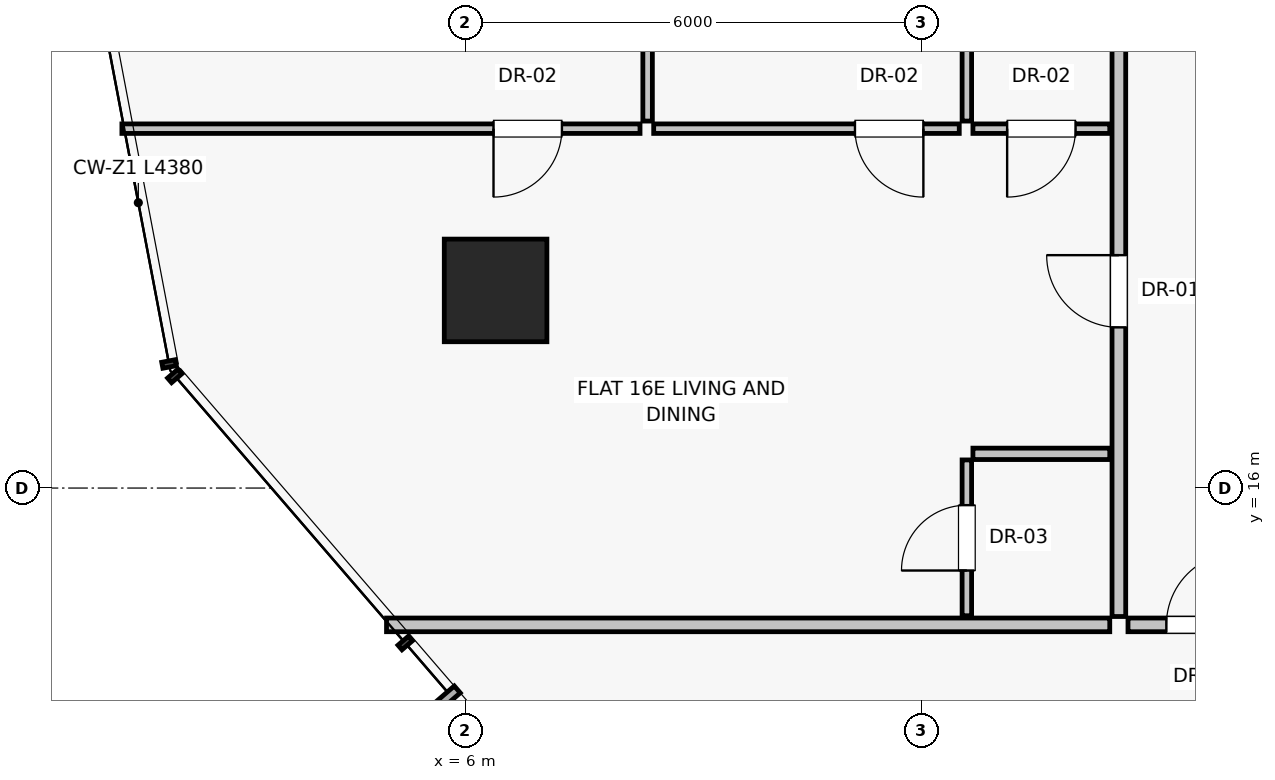
"""IFC4 building model, lengths in metres.
Left out: names, types, materials, properties, quantities, classifications, styles, units other than length and angle.
Written with IfcOpenShell. Run it as: python <this file> out.ifc"""

import sys

from ifc_helpers import new_model, si_unit, direction, frame, frame_2d, origin, origin_2d, place, context, subcontext, project, spatial, rectangle, extrude, source, transform, mapped, element, fill, save


model = new_model("IFC4")
c1 = context("Model", 3, precision=1e-05, world=origin(), true_north=direction((0.0, 1.0)))
c2 = subcontext(c1, "Body", "Model", "MODEL_VIEW")
j1 = project(units=[si_unit("LENGTHUNIT", "METRE"), si_unit("PLANEANGLEUNIT", "RADIAN")], contexts=[c1])
p1 = place(None, origin())
s1 = spatial("IfcSite", under=j1, at=p1, CompositionType="ELEMENT")
p2 = place(p1, origin())
s2 = spatial("IfcBuilding", under=s1, at=p2, CompositionType="ELEMENT")
p3 = place(p2, frame((0.0, 0.0, 60.85)))
s3 = spatial("IfcBuildingStorey", under=s2, at=p3, CompositionType="ELEMENT", Elevation=60.85)
p4 = place(p3, frame((6.4, 18.6, 0.0), z_axis=(0.0, 0.0, 1.0), x_axis=(1.0, 0.0, 0.0)))
e1 = element("IfcColumn", 1, at=p4, inside=s3, PredefinedType="COLUMN", context=c2, shape_type="SweptSolid", body=[
    extrude(rectangle(XDim=1.35, YDim=1.35, at=origin_2d()), origin(), (0.0, 0.0, 1.0), 3.25),
])
p5 = place(p3, frame((14.48, 14.2, 0.0), z_axis=(0.0, 0.0, 1.0), x_axis=(-1.0, 0.0, 0.0)))
e2 = element("IfcWall", 2, at=p5, inside=s3, PredefinedType="PARTITIONING", context=c2, shape_type="SweptSolid", body=[
    extrude(rectangle(XDim=9.515, YDim=0.18, at=frame_2d((4.757, 0.0))), origin(), (0.0, 0.0, 1.0), 3.0),
])
p6 = place(p3, frame((14.6, 14.31, 0.0), z_axis=(0.0, 0.0, 1.0), x_axis=(0.0, 1.0, 0.0)))
e3 = element("IfcWall", 3, at=p6, inside=s3, PredefinedType="PARTITIONING", context=c2, shape_type="SweptSolid", body=[
    extrude(rectangle(XDim=11.438, YDim=0.18, at=frame_2d((5.719, 0.0))), origin(), (0.0, 0.0, 1.0), 3.0),
])
p7 = place(p6, frame((3.804, 0.0, 0.0)))
e4 = element("IfcOpeningElement", 4, at=p7, cuts=e3, PredefinedType="OPENING", context=c2, shape_type="SweptSolid", body=[
    extrude(rectangle(XDim=0.95, YDim=2.02, at=frame_2d((0.475, 1.01))), frame((0.0, 0.1, 0.0), z_axis=(0.0, -1.0, 0.0), x_axis=(1.0, 0.0, 0.0)), (0.0, 0.0, 1.0), 0.2),
])
p8 = place(p3, frame((14.48, 16.45, 0.0), z_axis=(0.0, 0.0, 1.0), x_axis=(-1.0, 0.0, 0.0)))
e5 = element("IfcWall", 5, at=p8, inside=s3, PredefinedType="PARTITIONING", context=c2, shape_type="SweptSolid", body=[
    extrude(rectangle(XDim=1.8, YDim=0.15, at=frame_2d((0.9, 0.0))), origin(), (0.0, 0.0, 1.0), 3.0),
])
p9 = place(p3, frame((12.6, 14.32, 0.0), z_axis=(0.0, 0.0, 1.0), x_axis=(0.0, 1.0, 0.0)))
e6 = element("IfcWall", 6, at=p9, inside=s3, PredefinedType="PARTITIONING", context=c2, shape_type="SweptSolid", body=[
    extrude(rectangle(XDim=2.05, YDim=0.125, at=frame_2d((1.025, 0.0))), origin(), (0.0, 0.0, 1.0), 3.0),
])
p10 = place(p9, frame((0.595, 0.0, 0.0)))
e7 = element("IfcOpeningElement", 7, at=p10, cuts=e6, PredefinedType="OPENING", context=c2, shape_type="SweptSolid", body=[
    extrude(rectangle(XDim=0.86, YDim=2.01, at=frame_2d((0.43, 1.005))), frame((0.0, 0.073, 0.0), z_axis=(0.0, -1.0, 0.0), x_axis=(1.0, 0.0, 0.0)), (0.0, 0.0, 1.0), 0.145),
])
p11 = place(p3, frame((14.48, 20.728, 0.0), z_axis=(0.0, 0.0, 1.0), x_axis=(-1.0, 0.0, 0.0)))
e8 = element("IfcWall", 8, at=p11, inside=s3, PredefinedType="PARTITIONING", context=c2, shape_type="SweptSolid", body=[
    extrude(rectangle(XDim=1.8, YDim=0.125, at=frame_2d((0.9, 0.0))), origin(), (0.0, 0.0, 1.0), 3.0),
])
p12 = place(p11, frame((0.45, 0.0, 0.0)))
e9 = element("IfcOpeningElement", 9, at=p12, cuts=e8, PredefinedType="OPENING", context=c2, shape_type="SweptSolid", body=[
    extrude(rectangle(XDim=0.9, YDim=2.01, at=frame_2d((0.45, 1.005))), frame((0.0, 0.073, 0.0), z_axis=(0.0, -1.0, 0.0), x_axis=(1.0, 0.0, 0.0)), (0.0, 0.0, 1.0), 0.145),
])
for number, where, z_axis, x_axis in (
    (10, (12.6, 20.828, 0.0), (0.0, 0.0, 1.0), (0.0, 1.0, 0.0)),
    (11, (8.4, 20.828, 0.0), (0.0, 0.0, 1.0), (0.0, 1.0, 0.0)),
):
    element("IfcWall", number, at=place(p3, frame(where, z_axis=z_axis, x_axis=x_axis)), inside=s3, PredefinedType="PARTITIONING", context=c2, shape_type="SweptSolid", body=[
        extrude(rectangle(XDim=4.91, YDim=0.125, at=frame_2d((2.455, 0.0))), origin(), (0.0, 0.0, 1.0), 3.0),
    ])
p13 = place(p3, frame((12.5, 20.728, 0.0), z_axis=(0.0, 0.0, 1.0), x_axis=(-1.0, 0.0, 0.0)))
e12 = element("IfcWall", 12, at=p13, inside=s3, PredefinedType="PARTITIONING", context=c2, shape_type="SweptSolid", body=[
    extrude(rectangle(XDim=4.02, YDim=0.125, at=frame_2d((2.01, 0.0))), origin(), (0.0, 0.0, 1.0), 3.0),
])
p14 = place(p13, frame((0.472, 0.0, 0.0)))
e13 = element("IfcOpeningElement", 13, at=p14, cuts=e12, PredefinedType="OPENING", context=c2, shape_type="SweptSolid", body=[
    extrude(rectangle(XDim=0.9, YDim=2.01, at=frame_2d((0.45, 1.005))), frame((0.0, 0.073, 0.0), z_axis=(0.0, -1.0, 0.0), x_axis=(1.0, 0.0, 0.0)), (0.0, 0.0, 1.0), 0.145),
])
p15 = place(p3, frame((8.3, 20.728, 0.0), z_axis=(0.0, 0.0, 1.0), x_axis=(-1.0, 0.0, 0.0)))
e14 = element("IfcWall", 14, at=p15, inside=s3, PredefinedType="PARTITIONING", context=c2, shape_type="SweptSolid", body=[
    extrude(rectangle(XDim=6.816, YDim=0.125, at=frame_2d((3.408, 0.0))), origin(), (0.0, 0.0, 1.0), 3.0),
])
p16 = place(p15, frame((1.027, 0.0, 0.0)))
e15 = element("IfcOpeningElement", 15, at=p16, cuts=e14, PredefinedType="OPENING", context=c2, shape_type="SweptSolid", body=[
    extrude(rectangle(XDim=0.9, YDim=2.01, at=frame_2d((0.45, 1.005))), frame((0.0, 0.073, 0.0), z_axis=(0.0, -1.0, 0.0), x_axis=(1.0, 0.0, 0.0)), (0.0, 0.0, 1.0), 0.145),
])
p17 = place(p3, frame((14.72, 14.2, 0.0), z_axis=(0.0, 0.0, 1.0), x_axis=(1.0, 0.0, 0.0)))
e16 = element("IfcWall", 16, at=p17, inside=s3, PredefinedType="PARTITIONING", context=c2, shape_type="SweptSolid", body=[
    extrude(rectangle(XDim=1.96, YDim=0.18, at=frame_2d((0.98, 0.0))), origin(), (0.0, 0.0, 1.0), 3.0),
])
p18 = place(p17, frame((0.505, 0.0, 0.0)))
e17 = element("IfcOpeningElement", 17, at=p18, cuts=e16, PredefinedType="OPENING", context=c2, shape_type="SweptSolid", body=[
    extrude(rectangle(XDim=0.95, YDim=2.02, at=frame_2d((0.475, 1.01))), frame((0.0, 0.1, 0.0), z_axis=(0.0, -1.0, 0.0), x_axis=(1.0, 0.0, 0.0)), (0.0, 0.0, 1.0), 0.2),
])
m1 = source(origin(), c2, "Body", "SweptSolid", [
    extrude(rectangle(XDim=0.95, YDim=2.02, at=frame_2d((0.475, 1.01))), frame((0.0, 0.025, 0.0), z_axis=(0.0, -1.0, 0.0), x_axis=(1.0, 0.0, 0.0)), (0.0, 0.0, 1.0), 0.05),
])
p19 = place(p7, origin())
e18 = element("IfcDoor", 18, at=p19, inside=s3, OperationType="SINGLE_SWING_RIGHT", PredefinedType="DOOR", context=c2, shape_type="MappedRepresentation", body=[
    mapped(m1, transform((0.0, 0.0, 0.0), scale=1.0)),
])
fill(e4, e18)
m2 = source(origin(), c2, "Body", "SweptSolid", [
    extrude(rectangle(XDim=0.86, YDim=2.01, at=frame_2d((0.43, 1.005))), frame((0.0, 0.025, 0.0), z_axis=(0.0, -1.0, 0.0), x_axis=(1.0, 0.0, 0.0)), (0.0, 0.0, 1.0), 0.05),
])
p20 = place(p10, origin())
e19 = element("IfcDoor", 19, at=p20, inside=s3, OperationType="SINGLE_SWING_LEFT", PredefinedType="DOOR", context=c2, shape_type="MappedRepresentation", body=[
    mapped(m2, transform((0.0, 0.0, 0.0), scale=1.0)),
])
fill(e7, e19)
m3 = source(origin(), c2, "Body", "SweptSolid", [
    extrude(rectangle(XDim=0.9, YDim=2.01, at=frame_2d((0.45, 1.005))), frame((0.0, 0.025, 0.0), z_axis=(0.0, -1.0, 0.0), x_axis=(1.0, 0.0, 0.0)), (0.0, 0.0, 1.0), 0.05),
])
p21 = place(p12, origin())
e20 = element("IfcDoor", 20, at=p21, inside=s3, OperationType="SINGLE_SWING_RIGHT", PredefinedType="DOOR", context=c2, shape_type="MappedRepresentation", body=[
    mapped(m3, transform((0.0, 0.0, 0.0), scale=1.0)),
])
fill(e9, e20)
p22 = place(p14, origin())
e21 = element("IfcDoor", 21, at=p22, inside=s3, OperationType="SINGLE_SWING_LEFT", PredefinedType="DOOR", context=c2, shape_type="MappedRepresentation", body=[
    mapped(m3, transform((0.0, 0.0, 0.0), scale=1.0)),
])
fill(e13, e21)
p23 = place(p16, origin())
e22 = element("IfcDoor", 22, at=p23, inside=s3, OperationType="SINGLE_SWING_RIGHT", PredefinedType="DOOR", context=c2, shape_type="MappedRepresentation", body=[
    mapped(m3, transform((0.0, 0.0, 0.0), scale=1.0)),
])
fill(e15, e22)
p24 = place(p18, origin())
e23 = element("IfcDoor", 23, at=p24, inside=s3, OperationType="SINGLE_SWING_RIGHT", PredefinedType="DOOR", context=c2, shape_type="MappedRepresentation", body=[
    mapped(m1, transform((0.0, 0.0, 0.0), scale=1.0)),
])
fill(e17, e23)
save(model, sys.argv[1])
